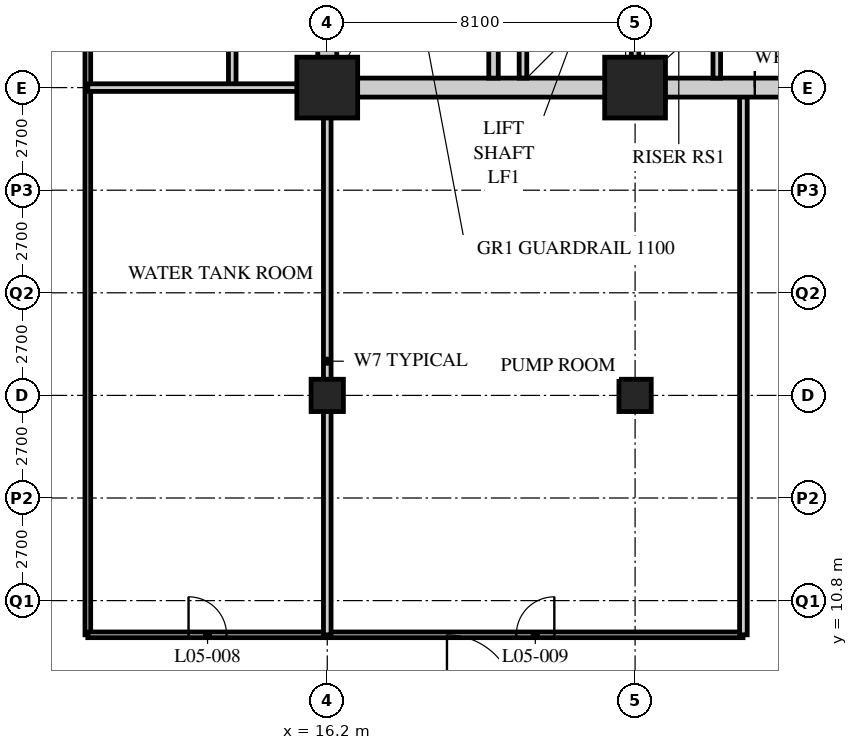
"""IFC4 building model, lengths in metres.
Left out: names, types, materials, properties, quantities, classifications, styles, units other than length and angle.
Written with IfcOpenShell. Run it as: python <this file> out.ifc"""

import sys

from ifc_helpers import new_model, si_unit, direction, frame, frame_2d, origin, origin_2d, place, context, subcontext, project, spatial, rectangle, hollow_rectangle, extrude, element, fill, save


model = new_model("IFC4")
c1 = context("Model", 3, precision=1e-05, world=origin(), true_north=direction((0.0, 1.0)))
c2 = subcontext(c1, "Body", "Model", "MODEL_VIEW")
j1 = project(units=[si_unit("LENGTHUNIT", "METRE"), si_unit("PLANEANGLEUNIT", "RADIAN")], contexts=[c1])
p1 = place(None, origin())
s1 = spatial("IfcSite", under=j1, at=p1, CompositionType="ELEMENT")
p2 = place(p1, origin())
s2 = spatial("IfcBuilding", under=s1, at=p2, CompositionType="ELEMENT")
p3 = place(p2, frame((0.0, 0.0, 27.6)))
s3 = spatial("IfcBuildingStorey", under=s2, at=p3, CompositionType="ELEMENT", Elevation=27.6)
p4 = place(p3, frame((16.2, 16.2, 0.0), z_axis=(0.0, 0.0, 1.0), x_axis=(1.0, 0.0, 0.0)))
e1 = element("IfcColumn", 1, at=p4, inside=s3, PredefinedType="COLUMN", context=c2, shape_type="SweptSolid", body=[
    extrude(hollow_rectangle(XDim=0.85, YDim=0.85, WallThickness=0.085, at=origin_2d()), origin(), (0.0, 0.0, 1.0), 5.4),
])
p5 = place(p3, frame((16.2, 24.3, 0.0), z_axis=(0.0, 0.0, 1.0), x_axis=(1.0, 0.0, 0.0)))
e2 = element("IfcColumn", 2, at=p5, inside=s3, PredefinedType="COLUMN", context=c2, shape_type="SweptSolid", body=[
    extrude(hollow_rectangle(XDim=1.6, YDim=1.6, WallThickness=0.15, at=origin_2d()), origin(), (0.0, 0.0, 1.0), 5.4),
])
p6 = place(p3, frame((24.3, 16.2, 0.0), z_axis=(0.0, 0.0, 1.0), x_axis=(1.0, 0.0, 0.0)))
e3 = element("IfcColumn", 3, at=p6, inside=s3, PredefinedType="COLUMN", context=c2, shape_type="SweptSolid", body=[
    extrude(hollow_rectangle(XDim=0.85, YDim=0.85, WallThickness=0.085, at=origin_2d()), origin(), (0.0, 0.0, 1.0), 5.4),
])
p7 = place(p3, frame((24.3, 24.3, 0.0), z_axis=(0.0, 0.0, 1.0), x_axis=(1.0, 0.0, 0.0)))
e4 = element("IfcColumn", 4, at=p7, inside=s3, PredefinedType="COLUMN", context=c2, shape_type="SweptSolid", body=[
    extrude(hollow_rectangle(XDim=1.6, YDim=1.6, WallThickness=0.15, at=origin_2d()), origin(), (0.0, 0.0, 1.0), 5.4),
])
p8 = place(p3, frame((9.9, 40.65, 0.0), z_axis=(0.0, 0.0, 1.0), x_axis=(0.0, -1.0, 0.0)))
e5 = element("IfcWall", 5, at=p8, inside=s3, PredefinedType="PARTITIONING", context=c2, shape_type="SweptSolid", body=[
    extrude(rectangle(XDim=30.75, YDim=0.15, at=frame_2d((15.375, 0.0))), origin(), (0.0, 0.0, 1.0), 5.19),
])
p9 = place(p8, frame((14.125, 0.0, 0.0)))
e6 = element("IfcOpeningElement", 6, at=p9, cuts=e5, PredefinedType="OPENING", context=c2, shape_type="SweptSolid", body=[
    extrude(rectangle(XDim=0.85, YDim=2.1, at=frame_2d((0.425, 1.05))), frame((0.0, 0.085, 0.0), z_axis=(0.0, -1.0, 0.0), x_axis=(1.0, 0.0, 0.0)), (0.0, 0.0, 1.0), 0.17),
])
p10 = place(p8, frame((10.0, 0.0, 0.0)))
e7 = element("IfcOpeningElement", 7, at=p10, cuts=e5, PredefinedType="OPENING", context=c2, shape_type="SweptSolid", body=[
    extrude(rectangle(XDim=1.0, YDim=2.1, at=frame_2d((0.5, 1.05))), frame((0.0, 0.085, 0.0), z_axis=(0.0, -1.0, 0.0), x_axis=(1.0, 0.0, 0.0)), (0.0, 0.0, 1.0), 0.17),
])
p11 = place(p8, frame((6.025, 0.0, 0.0)))
e8 = element("IfcOpeningElement", 8, at=p11, cuts=e5, PredefinedType="OPENING", context=c2, shape_type="SweptSolid", body=[
    extrude(rectangle(XDim=0.85, YDim=2.1, at=frame_2d((0.425, 1.05))), frame((0.0, 0.085, 0.0), z_axis=(0.0, -1.0, 0.0), x_axis=(1.0, 0.0, 0.0)), (0.0, 0.0, 1.0), 0.17),
])
p12 = place(p8, frame((1.9, 0.0, 0.0)))
e9 = element("IfcOpeningElement", 9, at=p12, cuts=e5, PredefinedType="OPENING", context=c2, shape_type="SweptSolid", body=[
    extrude(rectangle(XDim=1.0, YDim=2.1, at=frame_2d((0.5, 1.05))), frame((0.0, 0.085, 0.0), z_axis=(0.0, -1.0, 0.0), x_axis=(1.0, 0.0, 0.0)), (0.0, 0.0, 1.0), 0.17),
])
p13 = place(p3, frame((9.9, 9.9, 0.0), z_axis=(0.0, 0.0, 1.0), x_axis=(1.0, 0.0, 0.0)))
e10 = element("IfcWall", 10, at=p13, inside=s3, PredefinedType="PARTITIONING", context=c2, shape_type="SweptSolid", body=[
    extrude(rectangle(XDim=17.24, YDim=0.15, at=frame_2d((8.62, 0.0))), origin(), (0.0, 0.0, 1.0), 5.19),
])
p14 = place(p13, frame((2.65, 0.0, 0.0)))
e11 = element("IfcOpeningElement", 11, at=p14, cuts=e10, PredefinedType="OPENING", context=c2, shape_type="SweptSolid", body=[
    extrude(rectangle(XDim=1.0, YDim=2.1, at=frame_2d((0.5, 1.05))), frame((0.0, 0.085, 0.0), z_axis=(0.0, -1.0, 0.0), x_axis=(1.0, 0.0, 0.0)), (0.0, 0.0, 1.0), 0.17),
])
p15 = place(p13, frame((11.275, 0.0, 0.0)))
e12 = element("IfcOpeningElement", 12, at=p15, cuts=e10, PredefinedType="OPENING", context=c2, shape_type="SweptSolid", body=[
    extrude(rectangle(XDim=1.0, YDim=2.1, at=frame_2d((0.5, 1.05))), frame((0.0, 0.085, 0.0), z_axis=(0.0, -1.0, 0.0), x_axis=(1.0, 0.0, 0.0)), (0.0, 0.0, 1.0), 0.17),
])
p16 = place(p3, frame((13.7, 24.3, 0.0), z_axis=(0.0, 0.0, 1.0), x_axis=(0.0, 1.0, 0.0)))
e13 = element("IfcWall", 13, at=p16, inside=s3, PredefinedType="SOLIDWALL", context=c2, shape_type="SweptSolid", body=[
    extrude(rectangle(XDim=3.6, YDim=0.2, at=frame_2d((1.8, 0.0))), origin(), (0.0, 0.0, 1.0), 5.19),
])
p17 = place(p3, frame((16.2, 9.9, 0.0), z_axis=(0.0, 0.0, 1.0), x_axis=(0.0, 1.0, 0.0)))
e14 = element("IfcWall", 14, at=p17, inside=s3, PredefinedType="SOLIDWALL", context=c2, shape_type="SweptSolid", body=[
    extrude(rectangle(XDim=14.4, YDim=0.2, at=frame_2d((7.2, 0.0))), origin(), (0.0, 0.0, 1.0), 4.578),
])
p18 = place(p3, frame((27.15, 9.9, 0.0), z_axis=(0.0, 0.0, 1.0), x_axis=(0.0, 1.0, 0.0)))
e15 = element("IfcWall", 15, at=p18, inside=s3, PredefinedType="SOLIDWALL", context=c2, shape_type="SweptSolid", body=[
    extrude(rectangle(XDim=14.4, YDim=0.2, at=frame_2d((7.2, 0.0))), origin(), (0.0, 0.0, 1.0), 5.19),
])
p19 = place(p3, frame((9.9, 24.3, 0.0), z_axis=(0.0, 0.0, 1.0), x_axis=(1.0, 0.0, 0.0)))
e16 = element("IfcWall", 16, at=p19, inside=s3, PredefinedType="SOLIDWALL", context=c2, shape_type="SweptSolid", body=[
    extrude(rectangle(XDim=6.3, YDim=0.2, at=frame_2d((3.15, 0.0))), origin(), (0.0, 0.0, 1.0), 4.578),
])
p20 = place(p3, frame((15.95, 24.3, 0.0), z_axis=(0.0, 0.0, 1.0), x_axis=(1.0, 0.0, 0.0)))
e17 = element("IfcWall", 17, at=p20, inside=s3, PredefinedType="SOLIDWALL", context=c2, shape_type="SweptSolid", body=[
    extrude(rectangle(XDim=24.8, YDim=0.5, at=frame_2d((12.4, 0.0))), origin(), (0.0, 0.0, 1.0), 4.54),
])
p21 = place(p20, frame((11.5, 0.0, 0.0)))
e18 = element("IfcOpeningElement", 18, at=p21, cuts=e17, PredefinedType="OPENING", context=c2, shape_type="SweptSolid", body=[
    extrude(rectangle(XDim=1.8, YDim=2.4, at=frame_2d((0.9, 1.2))), frame((0.0, 0.26, 0.0), z_axis=(0.0, -1.0, 0.0), x_axis=(1.0, 0.0, 0.0)), (0.0, 0.0, 1.0), 0.52),
])
p22 = place(p3, frame((16.2, 24.55, 0.0), z_axis=(0.0, 0.0, 1.0), x_axis=(0.0, 1.0, 0.0)))
e19 = element("IfcWall", 19, at=p22, inside=s3, PredefinedType="SOLIDWALL", context=c2, shape_type="SweptSolid", body=[
    extrude(rectangle(XDim=15.7, YDim=0.5, at=frame_2d((7.85, 0.0))), origin(), (0.0, 0.0, 1.0), 4.578),
])
p23 = place(p3, frame((24.3, 24.55, 0.0), z_axis=(0.0, 0.0, 1.0), x_axis=(0.0, 1.0, 0.0)))
e20 = element("IfcWall", 20, at=p23, inside=s3, PredefinedType="SOLIDWALL", context=c2, shape_type="SweptSolid", body=[
    extrude(rectangle(XDim=7.75, YDim=0.2, at=frame_2d((3.875, 0.0))), origin(), (0.0, 0.0, 1.0), 4.578),
])
p24 = place(p23, frame((4.6, 0.0, 0.0)))
e21 = element("IfcOpeningElement", 21, at=p24, cuts=e20, PredefinedType="OPENING", context=c2, shape_type="SweptSolid", body=[
    extrude(rectangle(XDim=1.2, YDim=2.1, at=frame_2d((0.6, 1.05))), frame((0.0, 0.11, 0.0), z_axis=(0.0, -1.0, 0.0), x_axis=(1.0, 0.0, 0.0)), (0.0, 0.0, 1.0), 0.22),
])
p25 = place(p3, frame((20.575, 24.55, 0.0), z_axis=(0.0, 0.0, 1.0), x_axis=(0.0, 1.0, 0.0)))
e22 = element("IfcWall", 22, at=p25, inside=s3, PredefinedType="SOLIDWALL", context=c2, shape_type="SweptSolid", body=[
    extrude(rectangle(XDim=7.75, YDim=0.25, at=frame_2d((3.875, 0.0))), origin(), (0.0, 0.0, 1.0), 5.19),
])
p26 = place(p25, frame((6.2, 0.0, 0.0)))
e23 = element("IfcOpeningElement", 23, at=p26, cuts=e22, PredefinedType="OPENING", context=c2, shape_type="SweptSolid", body=[
    extrude(rectangle(XDim=1.2, YDim=2.1, at=frame_2d((0.6, 1.05))), frame((0.0, 0.135, 0.0), z_axis=(0.0, -1.0, 0.0), x_axis=(1.0, 0.0, 0.0)), (0.0, 0.0, 1.0), 0.27),
])
p27 = place(p3, frame((21.35, 24.55, 0.0), z_axis=(0.0, 0.0, 1.0), x_axis=(0.0, 1.0, 0.0)))
e24 = element("IfcWall", 24, at=p27, inside=s3, PredefinedType="SOLIDWALL", context=c2, shape_type="SweptSolid", body=[
    extrude(rectangle(XDim=2.6, YDim=0.2, at=frame_2d((1.3, 0.0))), origin(), (0.0, 0.0, 1.0), 5.19),
])
p28 = place(p3, frame((26.45, 24.55, 0.0), z_axis=(0.0, 0.0, 1.0), x_axis=(0.0, 1.0, 0.0)))
e25 = element("IfcWall", 25, at=p28, inside=s3, PredefinedType="SOLIDWALL", context=c2, shape_type="SweptSolid", body=[
    extrude(rectangle(XDim=1.6, YDim=0.2, at=frame_2d((0.8, 0.0))), origin(), (0.0, 0.0, 1.0), 5.19),
])
p29 = place(p14, origin())
e26 = element("IfcDoor", 26, at=p29, inside=s3, OperationType="SINGLE_SWING_LEFT", PredefinedType="DOOR", context=c2, shape_type="SweptSolid", body=[
    extrude(rectangle(XDim=1.0, YDim=2.1, at=frame_2d((0.5, 1.05))), frame((0.0, 0.025, 0.0), z_axis=(0.0, -1.0, 0.0), x_axis=(1.0, 0.0, 0.0)), (0.0, 0.0, 1.0), 0.05),
])
fill(e11, e26)
p30 = place(p15, origin())
e27 = element("IfcDoor", 27, at=p30, inside=s3, OperationType="SINGLE_SWING_RIGHT", PredefinedType="DOOR", context=c2, shape_type="SweptSolid", body=[
    extrude(rectangle(XDim=1.0, YDim=2.1, at=frame_2d((0.5, 1.05))), frame((0.0, 0.025, 0.0), z_axis=(0.0, -1.0, 0.0), x_axis=(1.0, 0.0, 0.0)), (0.0, 0.0, 1.0), 0.05),
])
fill(e12, e27)
p31 = place(p21, origin())
e28 = element("IfcDoor", 28, at=p31, inside=s3, OperationType="DOUBLE_DOOR_SINGLE_SWING", PredefinedType="DOOR", context=c2, shape_type="SweptSolid", body=[
    extrude(rectangle(XDim=1.8, YDim=2.4, at=frame_2d((0.9, 1.2))), frame((0.0, 0.025, 0.0), z_axis=(0.0, -1.0, 0.0), x_axis=(1.0, 0.0, 0.0)), (0.0, 0.0, 1.0), 0.05),
])
fill(e18, e28)
save(model, sys.argv[1])
